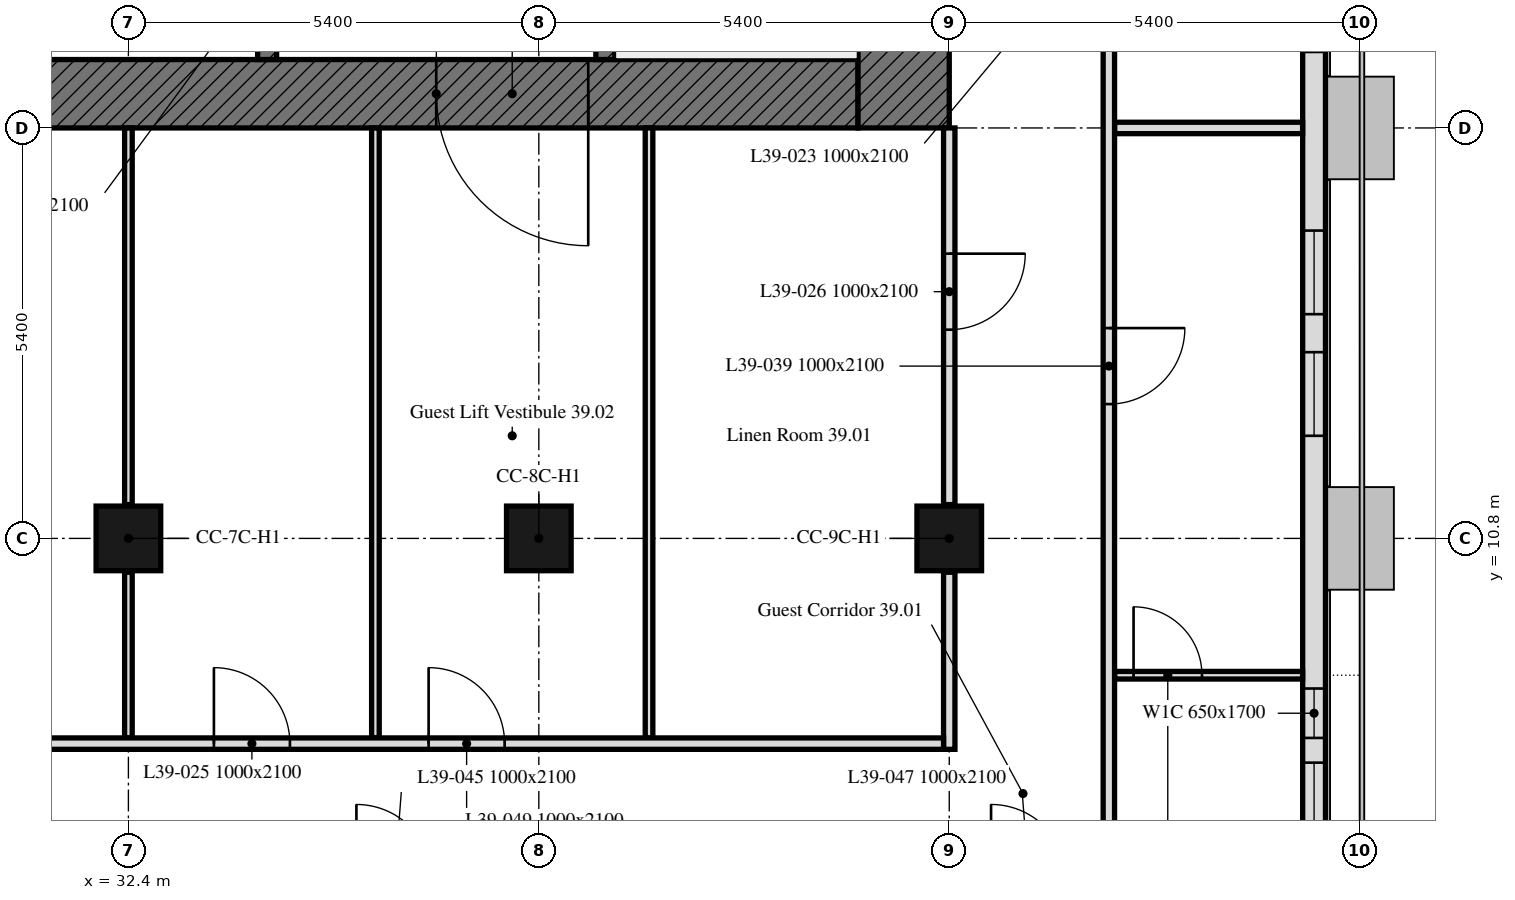
"""IFC4 building model, lengths in metres.
Left out: names, types, materials, properties, quantities, classifications, styles, units other than length and angle.
Written with IfcOpenShell. Run it as: python <this file> out.ifc"""

import sys

from ifc_helpers import new_model, si_unit, direction, frame, frame_2d, origin, origin_2d, place, context, subcontext, project, spatial, rectangle, extrude, element, fill, save


model = new_model("IFC4")
c1 = context("Model", 3, precision=1e-05, world=origin(), true_north=direction((0.0, 1.0)))
c2 = subcontext(c1, "Body", "Model", "MODEL_VIEW")
j1 = project(units=[si_unit("LENGTHUNIT", "METRE"), si_unit("PLANEANGLEUNIT", "RADIAN")], contexts=[c1])
p1 = place(None, origin())
s1 = spatial("IfcSite", under=j1, at=p1, CompositionType="ELEMENT")
p2 = place(p1, origin())
s2 = spatial("IfcBuilding", under=s1, at=p2, CompositionType="ELEMENT")
p3 = place(p2, frame((0.0, 0.0, 166.0)))
s3 = spatial("IfcBuildingStorey", under=s2, at=p3, CompositionType="ELEMENT", Elevation=166.0)
for number, where, z_axis, x_axis in (
    (1, (32.4, 10.8, 0.0), (0.0, 0.0, 1.0), (1.0, 0.0, 0.0)),
    (2, (37.8, 10.8, 0.0), (0.0, 0.0, 1.0), (1.0, 0.0, 0.0)),
    (3, (43.2, 10.8, 0.0), (0.0, 0.0, 1.0), (1.0, 0.0, 0.0)),
):
    element("IfcColumn", number, at=place(p3, frame(where, z_axis=z_axis, x_axis=x_axis)), inside=s3, PredefinedType="COLUMN", context=c2, shape_type="SweptSolid", body=[
        extrude(rectangle(XDim=0.85, YDim=0.85, at=origin_2d()), origin(), (0.0, 0.0, 1.0), 3.0),
    ])
p4 = place(p3, frame((48.0, 5.586, 0.0), z_axis=(0.0, 0.0, 1.0), x_axis=(0.0, 1.0, 0.0)))
e4 = element("IfcWall", 4, at=p4, inside=s3, PredefinedType="SOLIDWALL", context=c2, shape_type="SweptSolid", body=[
    extrude(rectangle(XDim=32.027, YDim=0.3, at=frame_2d((16.014, 0.0))), origin(), (0.0, 0.0, 1.0), 3.0),
])
p5 = place(p4, frame((1.164, 0.0, 0.9)))
e5 = element("IfcOpeningElement", 5, at=p5, cuts=e4, PredefinedType="OPENING", context=c2, shape_type="SweptSolid", body=[
    extrude(rectangle(XDim=1.1, YDim=1.7, at=frame_2d((0.55, 0.85))), frame((0.0, 0.16, 0.0), z_axis=(0.0, -1.0, 0.0), x_axis=(1.0, 0.0, 0.0)), (0.0, 0.0, 1.0), 0.32),
])
p6 = place(p4, frame((2.589, 0.0, 0.9)))
e6 = element("IfcOpeningElement", 6, at=p6, cuts=e4, PredefinedType="OPENING", context=c2, shape_type="SweptSolid", body=[
    extrude(rectangle(XDim=0.65, YDim=1.7, at=frame_2d((0.325, 0.85))), frame((0.0, 0.16, 0.0), z_axis=(0.0, -1.0, 0.0), x_axis=(1.0, 0.0, 0.0)), (0.0, 0.0, 1.0), 0.32),
])
p7 = place(p4, frame((6.564, 0.0, 0.9)))
e7 = element("IfcOpeningElement", 7, at=p7, cuts=e4, PredefinedType="OPENING", context=c2, shape_type="SweptSolid", body=[
    extrude(rectangle(XDim=1.1, YDim=1.7, at=frame_2d((0.55, 0.85))), frame((0.0, 0.16, 0.0), z_axis=(0.0, -1.0, 0.0), x_axis=(1.0, 0.0, 0.0)), (0.0, 0.0, 1.0), 0.32),
])
p8 = place(p4, frame((8.164, 0.0, 0.9)))
e8 = element("IfcOpeningElement", 8, at=p8, cuts=e4, PredefinedType="OPENING", context=c2, shape_type="SweptSolid", body=[
    extrude(rectangle(XDim=1.1, YDim=1.7, at=frame_2d((0.55, 0.85))), frame((0.0, 0.16, 0.0), z_axis=(0.0, -1.0, 0.0), x_axis=(1.0, 0.0, 0.0)), (0.0, 0.0, 1.0), 0.32),
])
p9 = place(p4, frame((11.614, 0.0, 0.9)))
e9 = element("IfcOpeningElement", 9, at=p9, cuts=e4, PredefinedType="OPENING", context=c2, shape_type="SweptSolid", body=[
    extrude(rectangle(XDim=3.4, YDim=1.7, at=frame_2d((1.7, 0.85))), frame((0.0, 0.16, 0.0), z_axis=(0.0, -1.0, 0.0), x_axis=(1.0, 0.0, 0.0)), (0.0, 0.0, 1.0), 0.32),
])
p10 = place(p4, frame((17.364, 0.0, 0.9)))
e10 = element("IfcOpeningElement", 10, at=p10, cuts=e4, PredefinedType="OPENING", context=c2, shape_type="SweptSolid", body=[
    extrude(rectangle(XDim=1.1, YDim=1.7, at=frame_2d((0.55, 0.85))), frame((0.0, 0.16, 0.0), z_axis=(0.0, -1.0, 0.0), x_axis=(1.0, 0.0, 0.0)), (0.0, 0.0, 1.0), 0.32),
])
p11 = place(p4, frame((18.964, 0.0, 0.9)))
e11 = element("IfcOpeningElement", 11, at=p11, cuts=e4, PredefinedType="OPENING", context=c2, shape_type="SweptSolid", body=[
    extrude(rectangle(XDim=1.1, YDim=1.7, at=frame_2d((0.55, 0.85))), frame((0.0, 0.16, 0.0), z_axis=(0.0, -1.0, 0.0), x_axis=(1.0, 0.0, 0.0)), (0.0, 0.0, 1.0), 0.32),
])
p12 = place(p4, frame((22.414, 0.0, 0.9)))
e12 = element("IfcOpeningElement", 12, at=p12, cuts=e4, PredefinedType="OPENING", context=c2, shape_type="SweptSolid", body=[
    extrude(rectangle(XDim=3.4, YDim=1.7, at=frame_2d((1.7, 0.85))), frame((0.0, 0.16, 0.0), z_axis=(0.0, -1.0, 0.0), x_axis=(1.0, 0.0, 0.0)), (0.0, 0.0, 1.0), 0.32),
])
p13 = place(p4, frame((28.164, 0.0, 0.9)))
e13 = element("IfcOpeningElement", 13, at=p13, cuts=e4, PredefinedType="OPENING", context=c2, shape_type="SweptSolid", body=[
    extrude(rectangle(XDim=1.1, YDim=1.7, at=frame_2d((0.55, 0.85))), frame((0.0, 0.16, 0.0), z_axis=(0.0, -1.0, 0.0), x_axis=(1.0, 0.0, 0.0)), (0.0, 0.0, 1.0), 0.32),
])
p14 = place(p4, frame((29.764, 0.0, 0.9)))
e14 = element("IfcOpeningElement", 14, at=p14, cuts=e4, PredefinedType="OPENING", context=c2, shape_type="SweptSolid", body=[
    extrude(rectangle(XDim=1.1, YDim=1.7, at=frame_2d((0.55, 0.85))), frame((0.0, 0.16, 0.0), z_axis=(0.0, -1.0, 0.0), x_axis=(1.0, 0.0, 0.0)), (0.0, 0.0, 1.0), 0.32),
])
p15 = place(p3, frame((42.0, 16.65, 0.0), z_axis=(0.0, 0.0, 1.0), x_axis=(-1.0, 0.0, 0.0)))
e15 = element("IfcWall", 15, at=p15, inside=s3, PredefinedType="SOLIDWALL", context=c2, shape_type="SweptSolid", body=[
    extrude(rectangle(XDim=11.1, YDim=0.9, at=frame_2d((5.55, 0.0))), origin(), (0.0, 0.0, 1.0), 3.0),
])
p16 = place(p15, frame((3.55, 0.0, 0.0)))
e16 = element("IfcOpeningElement", 16, at=p16, cuts=e15, PredefinedType="OPENING", context=c2, shape_type="SweptSolid", body=[
    extrude(rectangle(XDim=2.0, YDim=2.4, at=frame_2d((1.0, 1.2))), frame((0.0, 0.45, 0.0), z_axis=(0.0, -1.0, 0.0), x_axis=(1.0, 0.0, 0.0)), (0.0, 0.0, 1.0), 0.9),
])
p17 = place(p3, frame((42.6, 32.4, 0.0), z_axis=(0.0, 0.0, 1.0), x_axis=(0.0, -1.0, 0.0)))
e17 = element("IfcWall", 17, at=p17, inside=s3, PredefinedType="SOLIDWALL", context=c2, shape_type="SweptSolid", body=[
    extrude(rectangle(XDim=16.2, YDim=1.2, at=frame_2d((8.1, 0.0))), origin(), (0.0, 0.0, 1.0), 3.0),
])
p18 = place(p3, frame((38.675, 17.1, 0.0), z_axis=(0.0, 0.0, 1.0), x_axis=(0.0, 1.0, 0.0)))
e18 = element("IfcWall", 18, at=p18, inside=s3, PredefinedType="SOLIDWALL", context=c2, shape_type="SweptSolid", body=[
    extrude(rectangle(XDim=14.4, YDim=0.25, at=frame_2d((7.2, 0.0))), origin(), (0.0, 0.0, 1.0), 3.0),
])
p19 = place(p18, frame((4.6, 0.0, 0.0)))
e19 = element("IfcOpeningElement", 19, at=p19, cuts=e18, PredefinedType="OPENING", context=c2, shape_type="SweptSolid", body=[
    extrude(rectangle(XDim=1.0, YDim=2.1, at=frame_2d((0.5, 1.05))), frame((0.0, 0.125, 0.0), z_axis=(0.0, -1.0, 0.0), x_axis=(1.0, 0.0, 0.0)), (0.0, 0.0, 1.0), 0.25),
])
p20 = place(p18, frame((7.062, 0.0, 0.0)))
e20 = element("IfcOpeningElement", 20, at=p20, cuts=e18, PredefinedType="OPENING", context=c2, shape_type="SweptSolid", body=[
    extrude(rectangle(XDim=1.2, YDim=2.1, at=frame_2d((0.6, 1.05))), frame((0.0, 0.125, 0.0), z_axis=(0.0, -1.0, 0.0), x_axis=(1.0, 0.0, 0.0)), (0.0, 0.0, 1.0), 0.25),
])
p21 = place(p18, frame((9.726, 0.0, 0.0)))
e21 = element("IfcOpeningElement", 21, at=p21, cuts=e18, PredefinedType="OPENING", context=c2, shape_type="SweptSolid", body=[
    extrude(rectangle(XDim=0.9, YDim=2.1, at=frame_2d((0.45, 1.05))), frame((0.0, 0.125, 0.0), z_axis=(0.0, -1.0, 0.0), x_axis=(1.0, 0.0, 0.0)), (0.0, 0.0, 1.0), 0.25),
])
p22 = place(p18, frame((11.539, 0.0, 0.0)))
e22 = element("IfcOpeningElement", 22, at=p22, cuts=e18, PredefinedType="OPENING", context=c2, shape_type="SweptSolid", body=[
    extrude(rectangle(XDim=0.9, YDim=2.1, at=frame_2d((0.45, 1.05))), frame((0.0, 0.125, 0.0), z_axis=(0.0, -1.0, 0.0), x_axis=(1.0, 0.0, 0.0)), (0.0, 0.0, 1.0), 0.25),
])
p23 = place(p18, frame((13.226, 0.0, 0.0)))
e23 = element("IfcOpeningElement", 23, at=p23, cuts=e18, PredefinedType="OPENING", context=c2, shape_type="SweptSolid", body=[
    extrude(rectangle(XDim=0.9, YDim=2.1, at=frame_2d((0.45, 1.05))), frame((0.0, 0.125, 0.0), z_axis=(0.0, -1.0, 0.0), x_axis=(1.0, 0.0, 0.0)), (0.0, 0.0, 1.0), 0.25),
])
p24 = place(p3, frame((34.225, 17.1, 0.0), z_axis=(0.0, 0.0, 1.0), x_axis=(0.0, 1.0, 0.0)))
e24 = element("IfcWall", 24, at=p24, inside=s3, PredefinedType="SOLIDWALL", context=c2, shape_type="SweptSolid", body=[
    extrude(rectangle(XDim=14.4, YDim=0.25, at=frame_2d((7.2, 0.0))), origin(), (0.0, 0.0, 1.0), 3.0),
])
p25 = place(p24, frame((13.15, 0.0, 0.0)))
e25 = element("IfcOpeningElement", 25, at=p25, cuts=e24, PredefinedType="OPENING", context=c2, shape_type="SweptSolid", body=[
    extrude(rectangle(XDim=1.0, YDim=2.1, at=frame_2d((0.5, 1.05))), frame((0.0, 0.125, 0.0), z_axis=(0.0, -1.0, 0.0), x_axis=(1.0, 0.0, 0.0)), (0.0, 0.0, 1.0), 0.25),
])
p26 = place(p24, frame((0.6, 0.0, 0.0)))
e26 = element("IfcOpeningElement", 26, at=p26, cuts=e24, PredefinedType="OPENING", context=c2, shape_type="SweptSolid", body=[
    extrude(rectangle(XDim=1.1, YDim=2.1, at=frame_2d((0.55, 1.05))), frame((0.0, 0.125, 0.0), z_axis=(0.0, -1.0, 0.0), x_axis=(1.0, 0.0, 0.0)), (0.0, 0.0, 1.0), 0.25),
])
p27 = place(p24, frame((3.25, 0.0, 0.0)))
e27 = element("IfcOpeningElement", 27, at=p27, cuts=e24, PredefinedType="OPENING", context=c2, shape_type="SweptSolid", body=[
    extrude(rectangle(XDim=0.9, YDim=2.1, at=frame_2d((0.45, 1.05))), frame((0.0, 0.125, 0.0), z_axis=(0.0, -1.0, 0.0), x_axis=(1.0, 0.0, 0.0)), (0.0, 0.0, 1.0), 0.25),
])
p28 = place(p3, frame((47.849, 16.2, 0.0), z_axis=(0.0, 0.0, 1.0), x_axis=(-1.0, 0.0, 0.0)))
e28 = element("IfcWall", 28, at=p28, inside=s3, PredefinedType="PARTITIONING", context=c2, shape_type="SweptSolid", body=[
    extrude(rectangle(XDim=2.474, YDim=0.15, at=frame_2d((1.237, 0.0))), origin(), (0.0, 0.0, 1.0), 2.4),
])
p29 = place(p3, frame((45.375, 9.0, 0.0), z_axis=(0.0, 0.0, 1.0), x_axis=(1.0, 0.0, 0.0)))
e29 = element("IfcWall", 29, at=p29, inside=s3, PredefinedType="PARTITIONING", context=c2, shape_type="SweptSolid", body=[
    extrude(rectangle(XDim=2.474, YDim=0.1, at=frame_2d((1.237, 0.0))), origin(), (0.0, 0.0, 1.0), 3.0),
])
p30 = place(p29, frame((0.25, 0.0, 0.0)))
e30 = element("IfcOpeningElement", 30, at=p30, cuts=e29, PredefinedType="OPENING", context=c2, shape_type="SweptSolid", body=[
    extrude(rectangle(XDim=0.9, YDim=2.1, at=frame_2d((0.45, 1.05))), frame((0.0, 0.05, 0.0), z_axis=(0.0, -1.0, 0.0), x_axis=(1.0, 0.0, 0.0)), (0.0, 0.0, 1.0), 0.1),
])
p31 = place(p3, frame((45.3, 21.525, 0.0), z_axis=(0.0, 0.0, 1.0), x_axis=(0.0, -1.0, 0.0)))
e31 = element("IfcWall", 31, at=p31, inside=s3, PredefinedType="PARTITIONING", context=c2, shape_type="SweptSolid", body=[
    extrude(rectangle(XDim=15.15, YDim=0.15, at=frame_2d((7.575, 0.0))), origin(), (0.0, 0.0, 1.0), 2.4),
])
p32 = place(p31, frame((2.125, 0.0, 0.0)))
e32 = element("IfcOpeningElement", 32, at=p32, cuts=e31, PredefinedType="OPENING", context=c2, shape_type="SweptSolid", body=[
    extrude(rectangle(XDim=1.0, YDim=2.1, at=frame_2d((0.5, 1.05))), frame((0.0, 0.075, 0.0), z_axis=(0.0, -1.0, 0.0), x_axis=(1.0, 0.0, 0.0)), (0.0, 0.0, 1.0), 0.15),
])
p33 = place(p31, frame((7.958, 0.0, 0.0)))
e33 = element("IfcOpeningElement", 33, at=p33, cuts=e31, PredefinedType="OPENING", context=c2, shape_type="SweptSolid", body=[
    extrude(rectangle(XDim=1.0, YDim=2.1, at=frame_2d((0.5, 1.05))), frame((0.0, 0.075, 0.0), z_axis=(0.0, -1.0, 0.0), x_axis=(1.0, 0.0, 0.0)), (0.0, 0.0, 1.0), 0.15),
])
p34 = place(p3, frame((32.4, 8.175, 0.0), z_axis=(0.0, 0.0, 1.0), x_axis=(0.0, 1.0, 0.0)))
e34 = element("IfcWall", 34, at=p34, inside=s3, PredefinedType="PARTITIONING", context=c2, shape_type="SweptSolid", body=[
    extrude(rectangle(XDim=2.18, YDim=0.1, at=frame_2d((1.09, 0.0))), origin(), (0.0, 0.0, 1.0), 2.4),
])
p35 = place(p3, frame((32.4, 11.245, 0.0), z_axis=(0.0, 0.0, 1.0), x_axis=(0.0, 1.0, 0.0)))
e35 = element("IfcWall", 35, at=p35, inside=s3, PredefinedType="PARTITIONING", context=c2, shape_type="SweptSolid", body=[
    extrude(rectangle(XDim=4.955, YDim=0.1, at=frame_2d((2.478, 0.0))), origin(), (0.0, 0.0, 1.0), 2.4),
])
for number, where, z_axis, x_axis in (
    (36, (35.65, 16.2, 0.0), (0.0, 0.0, 1.0), (0.0, -1.0, 0.0)),
    (37, (39.25, 8.175, 0.0), (0.0, 0.0, 1.0), (0.0, 1.0, 0.0)),
):
    element("IfcWall", number, at=place(p3, frame(where, z_axis=z_axis, x_axis=x_axis)), inside=s3, PredefinedType="PARTITIONING", context=c2, shape_type="SweptSolid", body=[
        extrude(rectangle(XDim=8.025, YDim=0.1, at=frame_2d((4.012, 0.0))), origin(), (0.0, 0.0, 1.0), 2.4),
    ])
p36 = place(p3, frame((43.2, 16.2, 0.0), z_axis=(0.0, 0.0, 1.0), x_axis=(0.0, -1.0, 0.0)))
e38 = element("IfcWall", 38, at=p36, inside=s3, PredefinedType="PARTITIONING", context=c2, shape_type="SweptSolid", body=[
    extrude(rectangle(XDim=4.955, YDim=0.15, at=frame_2d((2.478, 0.0))), origin(), (0.0, 0.0, 1.0), 3.0),
])
p37 = place(p36, frame((1.654, 0.0, 0.0)))
e39 = element("IfcOpeningElement", 39, at=p37, cuts=e38, PredefinedType="OPENING", context=c2, shape_type="SweptSolid", body=[
    extrude(rectangle(XDim=1.0, YDim=2.1, at=frame_2d((0.5, 1.05))), frame((0.0, 0.075, 0.0), z_axis=(0.0, -1.0, 0.0), x_axis=(1.0, 0.0, 0.0)), (0.0, 0.0, 1.0), 0.15),
])
p38 = place(p3, frame((43.2, 10.355, 0.0), z_axis=(0.0, 0.0, 1.0), x_axis=(0.0, -1.0, 0.0)))
e40 = element("IfcWall", 40, at=p38, inside=s3, PredefinedType="PARTITIONING", context=c2, shape_type="SweptSolid", body=[
    extrude(rectangle(XDim=2.33, YDim=0.15, at=frame_2d((1.165, 0.0))), origin(), (0.0, 0.0, 1.0), 3.0),
])
p39 = place(p3, frame((6.151, 8.1, 0.0), z_axis=(0.0, 0.0, 1.0), x_axis=(1.0, 0.0, 0.0)))
e41 = element("IfcWall", 41, at=p39, inside=s3, PredefinedType="PARTITIONING", context=c2, shape_type="SweptSolid", body=[
    extrude(rectangle(XDim=36.974, YDim=0.15, at=frame_2d((18.487, 0.0))), origin(), (0.0, 0.0, 1.0), 2.4),
])
p40 = place(p39, frame((13.416, 0.0, 0.0)))
e42 = element("IfcOpeningElement", 42, at=p40, cuts=e41, PredefinedType="OPENING", context=c2, shape_type="SweptSolid", body=[
    extrude(rectangle(XDim=1.0, YDim=2.1, at=frame_2d((0.5, 1.05))), frame((0.0, 0.075, 0.0), z_axis=(0.0, -1.0, 0.0), x_axis=(1.0, 0.0, 0.0)), (0.0, 0.0, 1.0), 0.15),
])
p41 = place(p39, frame((23.049, 0.0, 0.0)))
e43 = element("IfcOpeningElement", 43, at=p41, cuts=e41, PredefinedType="OPENING", context=c2, shape_type="SweptSolid", body=[
    extrude(rectangle(XDim=1.0, YDim=2.1, at=frame_2d((0.5, 1.05))), frame((0.0, 0.075, 0.0), z_axis=(0.0, -1.0, 0.0), x_axis=(1.0, 0.0, 0.0)), (0.0, 0.0, 1.0), 0.15),
])
p42 = place(p39, frame((2.029, 0.0, 0.0)))
e44 = element("IfcOpeningElement", 44, at=p42, cuts=e41, PredefinedType="OPENING", context=c2, shape_type="SweptSolid", body=[
    extrude(rectangle(XDim=1.0, YDim=2.1, at=frame_2d((0.5, 1.05))), frame((0.0, 0.075, 0.0), z_axis=(0.0, -1.0, 0.0), x_axis=(1.0, 0.0, 0.0)), (0.0, 0.0, 1.0), 0.15),
])
p43 = place(p39, frame((27.374, 0.0, 0.0)))
e45 = element("IfcOpeningElement", 45, at=p43, cuts=e41, PredefinedType="OPENING", context=c2, shape_type="SweptSolid", body=[
    extrude(rectangle(XDim=1.0, YDim=2.1, at=frame_2d((0.5, 1.05))), frame((0.0, 0.075, 0.0), z_axis=(0.0, -1.0, 0.0), x_axis=(1.0, 0.0, 0.0)), (0.0, 0.0, 1.0), 0.15),
])
p44 = place(p39, frame((7.924, 0.0, 0.0)))
e46 = element("IfcOpeningElement", 46, at=p44, cuts=e41, PredefinedType="OPENING", context=c2, shape_type="SweptSolid", body=[
    extrude(rectangle(XDim=1.0, YDim=2.1, at=frame_2d((0.5, 1.05))), frame((0.0, 0.075, 0.0), z_axis=(0.0, -1.0, 0.0), x_axis=(1.0, 0.0, 0.0)), (0.0, 0.0, 1.0), 0.15),
])
p45 = place(p39, frame((4.699, 0.0, 0.0)))
e47 = element("IfcOpeningElement", 47, at=p45, cuts=e41, PredefinedType="OPENING", context=c2, shape_type="SweptSolid", body=[
    extrude(rectangle(XDim=1.8, YDim=2.4, at=frame_2d((0.9, 1.2))), frame((0.0, 0.075, 0.0), z_axis=(0.0, -1.0, 0.0), x_axis=(1.0, 0.0, 0.0)), (0.0, 0.0, 1.0), 0.15),
])
p46 = place(p39, frame((30.199, 0.0, 0.0)))
e48 = element("IfcOpeningElement", 48, at=p46, cuts=e41, PredefinedType="OPENING", context=c2, shape_type="SweptSolid", body=[
    extrude(rectangle(XDim=1.0, YDim=2.1, at=frame_2d((0.5, 1.05))), frame((0.0, 0.075, 0.0), z_axis=(0.0, -1.0, 0.0), x_axis=(1.0, 0.0, 0.0)), (0.0, 0.0, 1.0), 0.15),
])
p47 = place(p5, origin())
e49 = element("IfcWindow", 49, at=p47, inside=s3, PartitioningType="SINGLE_PANEL", PredefinedType="WINDOW", context=c2, shape_type="SweptSolid", body=[
    extrude(rectangle(XDim=1.1, YDim=1.7, at=frame_2d((0.55, 0.85))), frame((0.0, 0.03, 0.0), z_axis=(0.0, -1.0, 0.0), x_axis=(1.0, 0.0, 0.0)), (0.0, 0.0, 1.0), 0.06),
])
fill(e5, e49)
p48 = place(p6, origin())
e50 = element("IfcWindow", 50, at=p48, inside=s3, PartitioningType="SINGLE_PANEL", PredefinedType="WINDOW", context=c2, shape_type="SweptSolid", body=[
    extrude(rectangle(XDim=0.65, YDim=1.7, at=frame_2d((0.325, 0.85))), frame((0.0, 0.03, 0.0), z_axis=(0.0, -1.0, 0.0), x_axis=(1.0, 0.0, 0.0)), (0.0, 0.0, 1.0), 0.06),
])
fill(e6, e50)
p49 = place(p7, origin())
e51 = element("IfcWindow", 51, at=p49, inside=s3, PartitioningType="SINGLE_PANEL", PredefinedType="WINDOW", context=c2, shape_type="SweptSolid", body=[
    extrude(rectangle(XDim=1.1, YDim=1.7, at=frame_2d((0.55, 0.85))), frame((0.0, 0.03, 0.0), z_axis=(0.0, -1.0, 0.0), x_axis=(1.0, 0.0, 0.0)), (0.0, 0.0, 1.0), 0.06),
])
fill(e7, e51)
p50 = place(p8, origin())
e52 = element("IfcWindow", 52, at=p50, inside=s3, PartitioningType="SINGLE_PANEL", PredefinedType="WINDOW", context=c2, shape_type="SweptSolid", body=[
    extrude(rectangle(XDim=1.1, YDim=1.7, at=frame_2d((0.55, 0.85))), frame((0.0, 0.03, 0.0), z_axis=(0.0, -1.0, 0.0), x_axis=(1.0, 0.0, 0.0)), (0.0, 0.0, 1.0), 0.06),
])
fill(e8, e52)
p51 = place(p16, origin())
e53 = element("IfcDoor", 53, at=p51, inside=s3, OperationType="DOUBLE_DOOR_SINGLE_SWING", PredefinedType="DOOR", context=c2, shape_type="SweptSolid", body=[
    extrude(rectangle(XDim=2.0, YDim=2.4, at=frame_2d((1.0, 1.2))), frame((0.0, 0.025, 0.0), z_axis=(0.0, -1.0, 0.0), x_axis=(1.0, 0.0, 0.0)), (0.0, 0.0, 1.0), 0.05),
])
fill(e16, e53)
p52 = place(p30, origin())
e54 = element("IfcDoor", 54, at=p52, inside=s3, OperationType="SINGLE_SWING_LEFT", PredefinedType="DOOR", context=c2, shape_type="SweptSolid", body=[
    extrude(rectangle(XDim=0.9, YDim=2.1, at=frame_2d((0.45, 1.05))), frame((0.0, 0.025, 0.0), z_axis=(0.0, -1.0, 0.0), x_axis=(1.0, 0.0, 0.0)), (0.0, 0.0, 1.0), 0.05),
])
fill(e30, e54)
p53 = place(p43, origin())
e55 = element("IfcDoor", 55, at=p53, inside=s3, OperationType="SINGLE_SWING_LEFT", PredefinedType="DOOR", context=c2, shape_type="SweptSolid", body=[
    extrude(rectangle(XDim=1.0, YDim=2.1, at=frame_2d((0.5, 1.05))), frame((0.0, 0.025, 0.0), z_axis=(0.0, -1.0, 0.0), x_axis=(1.0, 0.0, 0.0)), (0.0, 0.0, 1.0), 0.05),
])
fill(e45, e55)
p54 = place(p37, origin())
e56 = element("IfcDoor", 56, at=p54, inside=s3, OperationType="SINGLE_SWING_RIGHT", PredefinedType="DOOR", context=c2, shape_type="SweptSolid", body=[
    extrude(rectangle(XDim=1.0, YDim=2.1, at=frame_2d((0.5, 1.05))), frame((0.0, 0.025, 0.0), z_axis=(0.0, -1.0, 0.0), x_axis=(1.0, 0.0, 0.0)), (0.0, 0.0, 1.0), 0.05),
])
fill(e39, e56)
p55 = place(p33, origin())
e57 = element("IfcDoor", 57, at=p55, inside=s3, OperationType="SINGLE_SWING_RIGHT", PredefinedType="DOOR", context=c2, shape_type="SweptSolid", body=[
    extrude(rectangle(XDim=1.0, YDim=2.1, at=frame_2d((0.5, 1.05))), frame((0.0, 0.025, 0.0), z_axis=(0.0, -1.0, 0.0), x_axis=(1.0, 0.0, 0.0)), (0.0, 0.0, 1.0), 0.05),
])
fill(e33, e57)
p56 = place(p46, origin())
e58 = element("IfcDoor", 58, at=p56, inside=s3, OperationType="SINGLE_SWING_RIGHT", PredefinedType="DOOR", context=c2, shape_type="SweptSolid", body=[
    extrude(rectangle(XDim=1.0, YDim=2.1, at=frame_2d((0.5, 1.05))), frame((0.0, 0.025, 0.0), z_axis=(0.0, -1.0, 0.0), x_axis=(1.0, 0.0, 0.0)), (0.0, 0.0, 1.0), 0.05),
])
fill(e48, e58)
save(model, sys.argv[1])
